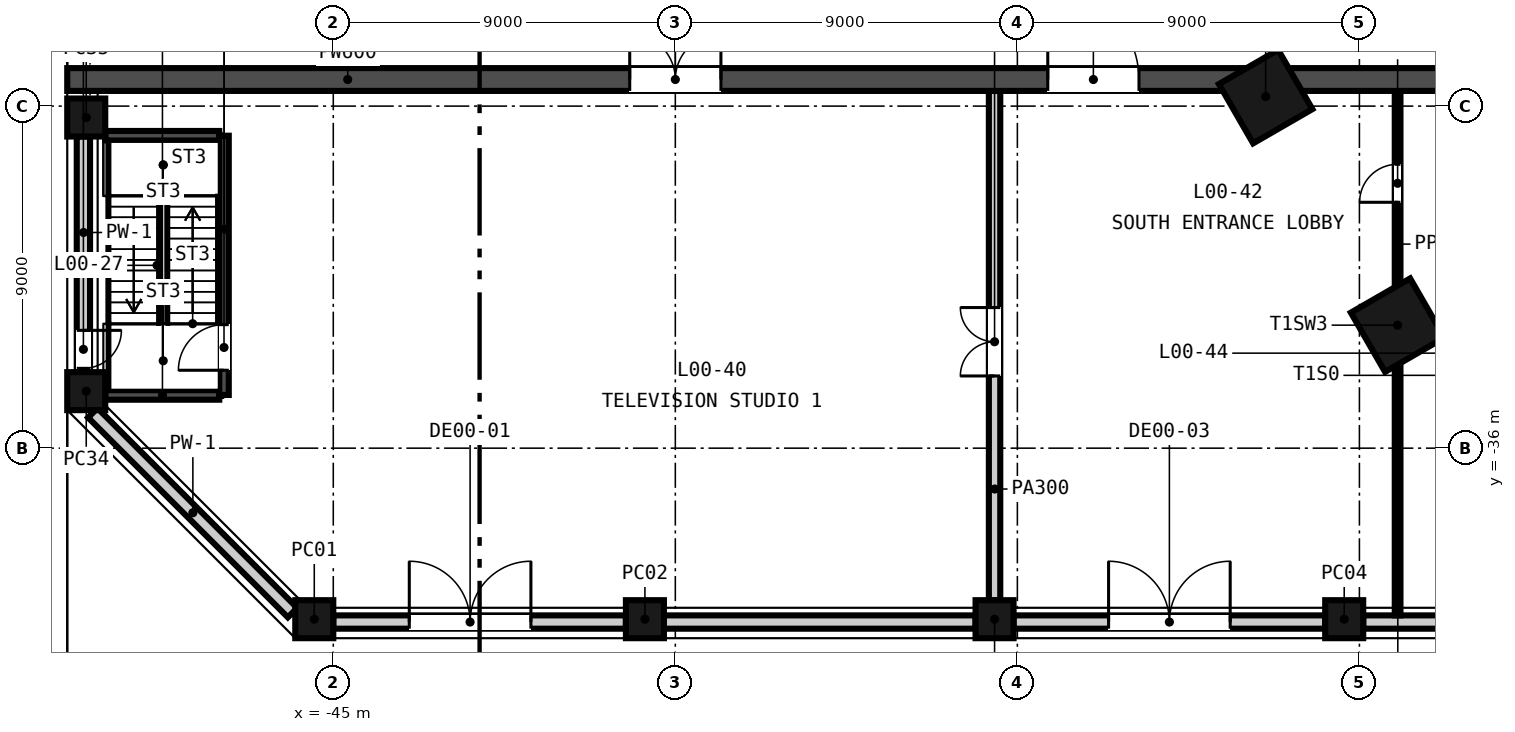
"""IFC4 building model, lengths in metres.
Left out: names, types, materials, properties, quantities, classifications, styles, units other than length and angle.
Written with IfcOpenShell. Run it as: python <this file> out.ifc"""

import sys

from ifc_helpers import new_model, si_unit, direction, frame, frame_2d, origin, origin_2d, place, context, subcontext, project, spatial, rectangle, extrude, element, fill, save


model = new_model("IFC4")
c1 = context("Model", 3, precision=1e-05, world=origin(), true_north=direction((0.0, 1.0)))
c2 = subcontext(c1, "Body", "Model", "MODEL_VIEW")
j1 = project(units=[si_unit("LENGTHUNIT", "METRE"), si_unit("PLANEANGLEUNIT", "RADIAN")], contexts=[c1])
p1 = place(None, origin())
s1 = spatial("IfcSite", under=j1, at=p1, CompositionType="ELEMENT")
p2 = place(p1, origin())
s2 = spatial("IfcBuilding", under=s1, at=p2, CompositionType="ELEMENT")
p3 = place(p2, origin())
s3 = spatial("IfcBuildingStorey", under=s2, at=p3, CompositionType="ELEMENT", Elevation=0.0)
for number, where, z_axis, x_axis in (
    (1, (-20.467, -26.75, -0.3), (0.0, 0.0, 1.0), (0.5, -0.866, 0.0)),
    (2, (-16.995, -32.763, -0.3), (0.0, 0.0, 1.0), (0.5, -0.866, 0.0)),
):
    element("IfcColumn", number, at=place(p3, frame(where, z_axis=z_axis, x_axis=x_axis)), inside=s3, PredefinedType="COLUMN", context=c2, shape_type="SweptSolid", body=[
        extrude(rectangle(XDim=1.8, YDim=1.8, at=origin_2d()), origin(), (0.0, 0.0, 1.0), 8.9),
    ])
for number, where, z_axis, x_axis in (
    (3, (-45.5, -40.5, -0.3), (0.0, 0.0, 1.0), (1.0, 0.0, 0.0)),
    (4, (-36.8, -40.5, -0.3), (0.0, 0.0, 1.0), (1.0, 0.0, 0.0)),
    (5, (-27.6, -40.5, -0.3), (0.0, 0.0, 1.0), (1.0, 0.0, 0.0)),
    (6, (-18.4, -40.5, -0.3), (0.0, 0.0, 1.0), (1.0, 0.0, 0.0)),
    (7, (-51.5, -34.5, -0.3), (0.0, 0.0, 1.0), (0.0, -1.0, 0.0)),
    (8, (-51.5, -27.3, -0.3), (0.0, 0.0, 1.0), (0.0, 1.0, 0.0)),
):
    element("IfcColumn", number, at=place(p3, frame(where, z_axis=z_axis, x_axis=x_axis)), inside=s3, PredefinedType="COLUMN", context=c2, shape_type="SweptSolid", body=[
        extrude(rectangle(XDim=1.0, YDim=1.0, at=origin_2d()), origin(), (0.0, 0.0, 1.0), 8.9),
    ])
p4 = place(p3, frame((-52.0, -26.3, -0.3), z_axis=(0.0, 0.0, 1.0), x_axis=(1.0, 0.0, 0.0)))
e9 = element("IfcWall", 9, at=p4, inside=s3, PredefinedType="SOLIDWALL", context=c2, shape_type="SweptSolid", body=[
    extrude(rectangle(XDim=31.032, YDim=0.6, at=frame_2d((15.516, 0.0))), origin(), (0.0, 0.0, 1.0), 8.9),
])
p5 = place(p4, frame((14.8, 0.0, 0.3)))
e10 = element("IfcOpeningElement", 10, at=p5, cuts=e9, PredefinedType="OPENING", context=c2, shape_type="SweptSolid", body=[
    extrude(rectangle(XDim=2.4, YDim=2.4, at=frame_2d((1.2, 1.2))), frame((0.0, 0.31, 0.0), z_axis=(0.0, -1.0, 0.0), x_axis=(1.0, 0.0, 0.0)), (0.0, 0.0, 1.0), 0.62),
])
p6 = place(p4, frame((25.8, 0.0, 0.3)))
e11 = element("IfcOpeningElement", 11, at=p6, cuts=e9, PredefinedType="OPENING", context=c2, shape_type="SweptSolid", body=[
    extrude(rectangle(XDim=2.4, YDim=2.4, at=frame_2d((1.2, 1.2))), frame((0.0, 0.31, 0.0), z_axis=(0.0, -1.0, 0.0), x_axis=(1.0, 0.0, 0.0)), (0.0, 0.0, 1.0), 0.62),
])
p7 = place(p3, frame((-19.861, -26.3, -0.3), z_axis=(0.0, 0.0, 1.0), x_axis=(1.0, 0.0, 0.0)))
e12 = element("IfcWall", 12, at=p7, inside=s3, PredefinedType="SOLIDWALL", context=c2, shape_type="SweptSolid", body=[
    extrude(rectangle(XDim=71.861, YDim=0.6, at=frame_2d((35.93, 0.0))), origin(), (0.0, 0.0, 1.0), 8.9),
])
p8 = place(p7, frame((54.661, 0.0, 0.3)))
e13 = element("IfcOpeningElement", 13, at=p8, cuts=e12, PredefinedType="OPENING", context=c2, shape_type="SweptSolid", body=[
    extrude(rectangle(XDim=2.4, YDim=2.4, at=frame_2d((1.2, 1.2))), frame((0.0, 0.31, 0.0), z_axis=(0.0, -1.0, 0.0), x_axis=(1.0, 0.0, 0.0)), (0.0, 0.0, 1.0), 0.62),
])
p9 = place(p7, frame((8.589, 0.0, 0.3)))
e14 = element("IfcOpeningElement", 14, at=p9, cuts=e12, PredefinedType="OPENING", context=c2, shape_type="SweptSolid", body=[
    extrude(rectangle(XDim=1.8, YDim=2.4, at=frame_2d((0.9, 1.2))), frame((0.0, 0.31, 0.0), z_axis=(0.0, -1.0, 0.0), x_axis=(1.0, 0.0, 0.0)), (0.0, 0.0, 1.0), 0.62),
])
p10 = place(p7, frame((16.551, 0.0, 0.3)))
e15 = element("IfcOpeningElement", 15, at=p10, cuts=e12, PredefinedType="OPENING", context=c2, shape_type="SweptSolid", body=[
    extrude(rectangle(XDim=1.8, YDim=2.4, at=frame_2d((0.9, 1.2))), frame((0.0, 0.31, 0.0), z_axis=(0.0, -1.0, 0.0), x_axis=(1.0, 0.0, 0.0)), (0.0, 0.0, 1.0), 0.62),
])
p11 = place(p7, frame((24.952, 0.0, 0.3)))
e16 = element("IfcOpeningElement", 16, at=p11, cuts=e12, PredefinedType="OPENING", context=c2, shape_type="SweptSolid", body=[
    extrude(rectangle(XDim=1.8, YDim=2.4, at=frame_2d((0.9, 1.2))), frame((0.0, 0.31, 0.0), z_axis=(0.0, -1.0, 0.0), x_axis=(1.0, 0.0, 0.0)), (0.0, 0.0, 1.0), 0.62),
])
p12 = place(p7, frame((32.914, 0.0, 0.3)))
e17 = element("IfcOpeningElement", 17, at=p12, cuts=e12, PredefinedType="OPENING", context=c2, shape_type="SweptSolid", body=[
    extrude(rectangle(XDim=1.8, YDim=2.4, at=frame_2d((0.9, 1.2))), frame((0.0, 0.31, 0.0), z_axis=(0.0, -1.0, 0.0), x_axis=(1.0, 0.0, 0.0)), (0.0, 0.0, 1.0), 0.62),
])
p13 = place(p7, frame((43.661, 0.0, 0.3)))
e18 = element("IfcOpeningElement", 18, at=p13, cuts=e12, PredefinedType="OPENING", context=c2, shape_type="SweptSolid", body=[
    extrude(rectangle(XDim=2.4, YDim=2.4, at=frame_2d((1.2, 1.2))), frame((0.0, 0.31, 0.0), z_axis=(0.0, -1.0, 0.0), x_axis=(1.0, 0.0, 0.0)), (0.0, 0.0, 1.0), 0.62),
])
p14 = place(p3, frame((-45.0, -40.575, -0.3), z_axis=(0.0, 0.0, 1.0), x_axis=(1.0, 0.0, 0.0)))
e19 = element("IfcWall", 19, at=p14, inside=s3, PredefinedType="SOLIDWALL", context=c2, shape_type="SweptSolid", body=[
    extrude(rectangle(XDim=7.7, YDim=0.35, at=frame_2d((3.85, 0.0))), origin(), (0.0, 0.0, 1.0), 8.0),
])
p15 = place(p14, frame((2.0, 0.0, 0.3)))
e20 = element("IfcOpeningElement", 20, at=p15, cuts=e19, PredefinedType="OPENING", context=c2, shape_type="SweptSolid", body=[
    extrude(rectangle(XDim=3.2, YDim=4.0, at=frame_2d((1.6, 2.0))), frame((0.0, 0.185, 0.0), z_axis=(0.0, -1.0, 0.0), x_axis=(1.0, 0.0, 0.0)), (0.0, 0.0, 1.0), 0.37),
])
p16 = place(p3, frame((-36.3, -40.575, -0.3), z_axis=(0.0, 0.0, 1.0), x_axis=(1.0, 0.0, 0.0)))
e21 = element("IfcWall", 21, at=p16, inside=s3, PredefinedType="SOLIDWALL", context=c2, shape_type="SweptSolid", body=[
    extrude(rectangle(XDim=8.2, YDim=0.35, at=frame_2d((4.1, 0.0))), origin(), (0.0, 0.0, 1.0), 8.0),
])
p17 = place(p3, frame((-27.1, -40.575, -0.3), z_axis=(0.0, 0.0, 1.0), x_axis=(1.0, 0.0, 0.0)))
e22 = element("IfcWall", 22, at=p17, inside=s3, PredefinedType="SOLIDWALL", context=c2, shape_type="SweptSolid", body=[
    extrude(rectangle(XDim=8.2, YDim=0.35, at=frame_2d((4.1, 0.0))), origin(), (0.0, 0.0, 1.0), 8.0),
])
p18 = place(p17, frame((2.5, 0.0, 0.3)))
e23 = element("IfcOpeningElement", 23, at=p18, cuts=e22, PredefinedType="OPENING", context=c2, shape_type="SweptSolid", body=[
    extrude(rectangle(XDim=3.2, YDim=4.0, at=frame_2d((1.6, 2.0))), frame((0.0, 0.185, 0.0), z_axis=(0.0, -1.0, 0.0), x_axis=(1.0, 0.0, 0.0)), (0.0, 0.0, 1.0), 0.37),
])
p19 = place(p3, frame((-17.9, -40.575, -0.3), z_axis=(0.0, 0.0, 1.0), x_axis=(1.0, 0.0, 0.0)))
e24 = element("IfcWall", 24, at=p19, inside=s3, PredefinedType="SOLIDWALL", context=c2, shape_type="SweptSolid", body=[
    extrude(rectangle(XDim=8.2, YDim=0.35, at=frame_2d((4.1, 0.0))), origin(), (0.0, 0.0, 1.0), 8.0),
])
p20 = place(p3, frame((-51.575, -27.8, -0.3), z_axis=(0.0, 0.0, 1.0), x_axis=(0.0, -1.0, 0.0)))
e25 = element("IfcWall", 25, at=p20, inside=s3, PredefinedType="SOLIDWALL", context=c2, shape_type="SweptSolid", body=[
    extrude(rectangle(XDim=6.2, YDim=0.35, at=frame_2d((3.1, 0.0))), origin(), (0.0, 0.0, 1.0), 8.0),
])
p21 = place(p20, frame((5.1, 0.0, 0.3)))
e26 = element("IfcOpeningElement", 26, at=p21, cuts=e25, PredefinedType="OPENING", context=c2, shape_type="SweptSolid", body=[
    extrude(rectangle(XDim=1.0, YDim=2.4, at=frame_2d((0.5, 1.2))), frame((0.0, 0.185, 0.0), z_axis=(0.0, -1.0, 0.0), x_axis=(1.0, 0.0, 0.0)), (0.0, 0.0, 1.0), 0.37),
])
p22 = place(p3, frame((-51.327, -35.072, -0.3), z_axis=(0.0, 0.0, 1.0), x_axis=(0.707106781187, -0.707106781187, 0.0)))
e27 = element("IfcWall", 27, at=p22, inside=s3, PredefinedType="SOLIDWALL", context=c2, shape_type="SweptSolid", body=[
    extrude(rectangle(XDim=7.433, YDim=0.35, at=frame_2d((3.716, 0.0))), origin(), (0.0, 0.0, 1.0), 8.0),
])
for number, where, z_axis, x_axis in (
    (28, (-51.0, -34.6, 0.0), (0.0, 0.0, 1.0), (1.0, 0.0, 0.0)),
    (29, (-51.0, -27.779, 0.0), (0.0, 0.0, 1.0), (1.0, 0.0, 0.0)),
):
    element("IfcWall", number, at=place(p3, frame(where, z_axis=z_axis, x_axis=x_axis)), inside=s3, PredefinedType="SHEAR", context=c2, shape_type="SweptSolid", body=[
        extrude(rectangle(XDim=3.0, YDim=0.25, at=frame_2d((1.5, 0.0))), origin(), (0.0, 0.0, 1.0), 8.6),
    ])
p23 = place(p3, frame((-47.875, -34.6, 0.0), z_axis=(0.0, 0.0, 1.0), x_axis=(0.0, 1.0, 0.0)))
e30 = element("IfcWall", 30, at=p23, inside=s3, PredefinedType="SHEAR", context=c2, shape_type="SweptSolid", body=[
    extrude(rectangle(XDim=6.821, YDim=0.25, at=frame_2d((3.411, 0.0))), origin(), (0.0, 0.0, 1.0), 8.6),
])
p24 = place(p23, frame((0.65, 0.0, 0.0)))
e31 = element("IfcOpeningElement", 31, at=p24, cuts=e30, PredefinedType="OPENING", context=c2, shape_type="SweptSolid", body=[
    extrude(rectangle(XDim=1.2, YDim=2.1, at=frame_2d((0.6, 1.05))), frame((0.0, 0.135, 0.0), z_axis=(0.0, -1.0, 0.0), x_axis=(1.0, 0.0, 0.0)), (0.0, 0.0, 1.0), 0.27),
])
p25 = place(p3, frame((-27.6, -40.0, 0.0), z_axis=(0.0, 0.0, 1.0), x_axis=(0.0, 1.0, 0.0)))
e32 = element("IfcWall", 32, at=p25, inside=s3, PredefinedType="PARTITIONING", context=c2, shape_type="SweptSolid", body=[
    extrude(rectangle(XDim=13.4, YDim=0.3, at=frame_2d((6.7, 0.0))), origin(), (0.0, 0.0, 1.0), 8.6),
])
p26 = place(p25, frame((5.9, 0.0, 0.0)))
e33 = element("IfcOpeningElement", 33, at=p26, cuts=e32, PredefinedType="OPENING", context=c2, shape_type="SweptSolid", body=[
    extrude(rectangle(XDim=1.8, YDim=2.4, at=frame_2d((0.9, 1.2))), frame((0.0, 0.16, 0.0), z_axis=(0.0, -1.0, 0.0), x_axis=(1.0, 0.0, 0.0)), (0.0, 0.0, 1.0), 0.32),
])
p27 = place(p3, frame((-16.995, -40.4, 0.0), z_axis=(0.0, 0.0, 1.0), x_axis=(0.0, 1.0, 0.0)))
e34 = element("IfcWall", 34, at=p27, inside=s3, PredefinedType="PARTITIONING", context=c2, shape_type="SweptSolid", body=[
    extrude(rectangle(XDim=6.554, YDim=0.15, at=frame_2d((3.277, 0.0))), origin(), (0.0, 0.0, 1.0), 8.6),
])
p28 = place(p3, frame((-16.995, -31.681, 0.0), z_axis=(0.0, 0.0, 1.0), x_axis=(0.0, 1.0, 0.0)))
e35 = element("IfcWall", 35, at=p28, inside=s3, PredefinedType="PARTITIONING", context=c2, shape_type="SweptSolid", body=[
    extrude(rectangle(XDim=5.081, YDim=0.15, at=frame_2d((2.54, 0.0))), origin(), (0.0, 0.0, 1.0), 8.6),
])
p29 = place(p28, frame((2.15, 0.0, 0.0)))
e36 = element("IfcOpeningElement", 36, at=p29, cuts=e35, PredefinedType="OPENING", context=c2, shape_type="SweptSolid", body=[
    extrude(rectangle(XDim=1.0, YDim=2.1, at=frame_2d((0.5, 1.05))), frame((0.0, 0.085, 0.0), z_axis=(0.0, -1.0, 0.0), x_axis=(1.0, 0.0, 0.0)), (0.0, 0.0, 1.0), 0.17),
])
p30 = place(p15, origin())
e37 = element("IfcDoor", 37, at=p30, inside=s3, OperationType="DOUBLE_DOOR_SINGLE_SWING", PredefinedType="DOOR", context=c2, shape_type="SweptSolid", body=[
    extrude(rectangle(XDim=3.2, YDim=4.0, at=frame_2d((1.6, 2.0))), frame((0.0, 0.025, 0.0), z_axis=(0.0, -1.0, 0.0), x_axis=(1.0, 0.0, 0.0)), (0.0, 0.0, 1.0), 0.05),
])
fill(e20, e37)
p31 = place(p18, origin())
e38 = element("IfcDoor", 38, at=p31, inside=s3, OperationType="DOUBLE_DOOR_SINGLE_SWING", PredefinedType="DOOR", context=c2, shape_type="SweptSolid", body=[
    extrude(rectangle(XDim=3.2, YDim=4.0, at=frame_2d((1.6, 2.0))), frame((0.0, 0.025, 0.0), z_axis=(0.0, -1.0, 0.0), x_axis=(1.0, 0.0, 0.0)), (0.0, 0.0, 1.0), 0.05),
])
fill(e23, e38)
p32 = place(p21, frame((1.0, 0.0, 0.0), z_axis=(0.0, 0.0, 1.0), x_axis=(-1.0, 0.0, 0.0)))
e39 = element("IfcDoor", 39, at=p32, inside=s3, OperationType="SINGLE_SWING_LEFT", PredefinedType="DOOR", context=c2, shape_type="SweptSolid", body=[
    extrude(rectangle(XDim=1.0, YDim=2.4, at=frame_2d((0.5, 1.2))), frame((0.0, 0.025, 0.0), z_axis=(0.0, -1.0, 0.0), x_axis=(1.0, 0.0, 0.0)), (0.0, 0.0, 1.0), 0.05),
])
fill(e26, e39)
p33 = place(p24, origin())
e40 = element("IfcDoor", 40, at=p33, inside=s3, OperationType="SINGLE_SWING_LEFT", PredefinedType="DOOR", context=c2, shape_type="SweptSolid", body=[
    extrude(rectangle(XDim=1.2, YDim=2.1, at=frame_2d((0.6, 1.05))), frame((0.0, 0.025, 0.0), z_axis=(0.0, -1.0, 0.0), x_axis=(1.0, 0.0, 0.0)), (0.0, 0.0, 1.0), 0.05),
])
fill(e31, e40)
p34 = place(p26, origin())
e41 = element("IfcDoor", 41, at=p34, inside=s3, OperationType="SINGLE_SWING_LEFT", PredefinedType="DOOR", context=c2, shape_type="SweptSolid", body=[
    extrude(rectangle(XDim=1.8, YDim=2.4, at=frame_2d((0.9, 1.2))), frame((0.0, 0.025, 0.0), z_axis=(0.0, -1.0, 0.0), x_axis=(1.0, 0.0, 0.0)), (0.0, 0.0, 1.0), 0.05),
])
fill(e33, e41)
p35 = place(p29, origin())
e42 = element("IfcDoor", 42, at=p35, inside=s3, OperationType="SINGLE_SWING_LEFT", PredefinedType="DOOR", context=c2, shape_type="SweptSolid", body=[
    extrude(rectangle(XDim=1.0, YDim=2.1, at=frame_2d((0.5, 1.05))), frame((0.0, 0.025, 0.0), z_axis=(0.0, -1.0, 0.0), x_axis=(1.0, 0.0, 0.0)), (0.0, 0.0, 1.0), 0.05),
])
fill(e36, e42)
p36 = place(p5, origin())
e43 = element("IfcDoor", 43, at=p36, inside=s3, OperationType="SINGLE_SWING_LEFT", PredefinedType="DOOR", context=c2, shape_type="SweptSolid", body=[
    extrude(rectangle(XDim=2.4, YDim=2.4, at=frame_2d((1.2, 1.2))), frame((0.0, 0.025, 0.0), z_axis=(0.0, -1.0, 0.0), x_axis=(1.0, 0.0, 0.0)), (0.0, 0.0, 1.0), 0.05),
])
fill(e10, e43)
p37 = place(p6, origin())
e44 = element("IfcDoor", 44, at=p37, inside=s3, OperationType="SINGLE_SWING_LEFT", PredefinedType="DOOR", context=c2, shape_type="SweptSolid", body=[
    extrude(rectangle(XDim=2.4, YDim=2.4, at=frame_2d((1.2, 1.2))), frame((0.0, 0.025, 0.0), z_axis=(0.0, -1.0, 0.0), x_axis=(1.0, 0.0, 0.0)), (0.0, 0.0, 1.0), 0.05),
])
fill(e11, e44)
save(model, sys.argv[1])
